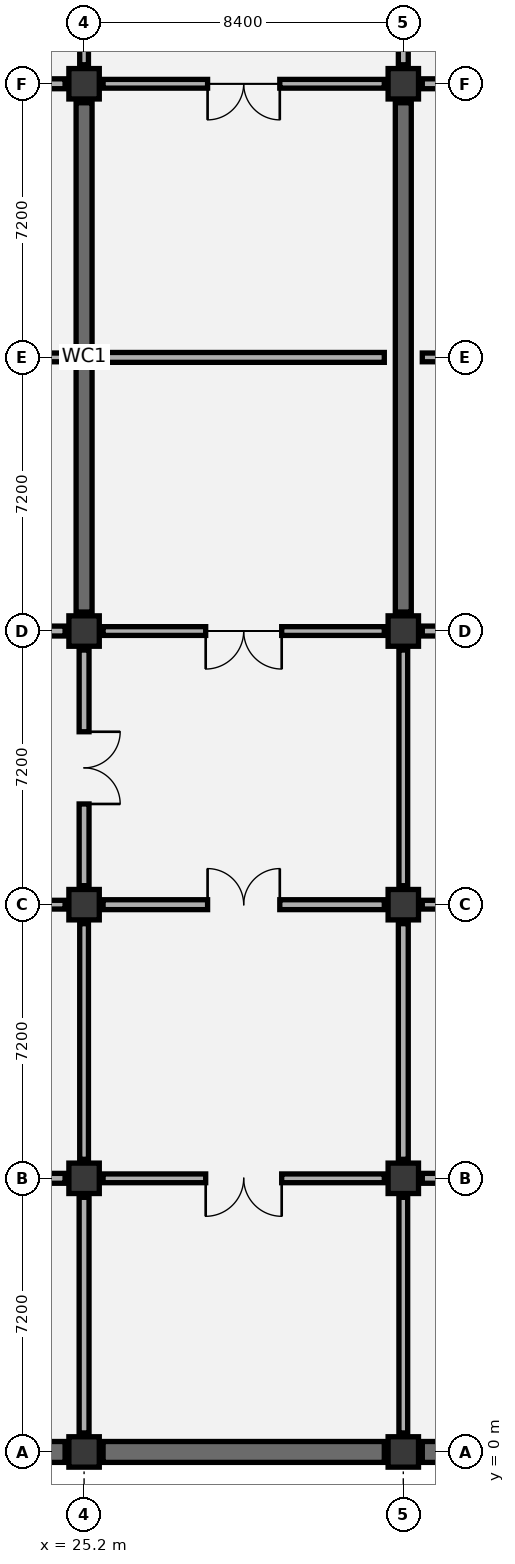
"""IFC4 building model, lengths in metres.
Left out: names, types, materials, properties, quantities, classifications, styles, units other than length and angle.
Written with IfcOpenShell. Run it as: python <this file> out.ifc"""

import sys

from ifc_helpers import new_model, si_unit, direction, frame, frame_2d, origin, origin_2d, place, context, subcontext, project, spatial, rectangle, extrude, element, fill, save


model = new_model("IFC4")
c1 = context("Model", 3, precision=1e-05, world=origin(), true_north=direction((0.0, 1.0)))
c2 = subcontext(c1, "Body", "Model", "MODEL_VIEW")
j1 = project(units=[si_unit("LENGTHUNIT", "METRE"), si_unit("PLANEANGLEUNIT", "RADIAN")], contexts=[c1])
p1 = place(None, origin())
s1 = spatial("IfcSite", under=j1, at=p1, CompositionType="ELEMENT")
p2 = place(p1, origin())
s2 = spatial("IfcBuilding", under=s1, at=p2, CompositionType="ELEMENT")
p3 = place(p2, frame((0.0, 0.0, -9.6)))
s3 = spatial("IfcBuildingStorey", under=s2, at=p3, CompositionType="ELEMENT", Elevation=-9.6)
for number, where, z_axis, x_axis in (
    (1, (25.2, 0.0, 0.0), (0.0, 0.0, 1.0), (1.0, 0.0, 0.0)),
    (2, (25.2, 7.2, 0.0), (0.0, 0.0, 1.0), (1.0, 0.0, 0.0)),
    (3, (25.2, 14.4, 0.0), (0.0, 0.0, 1.0), (1.0, 0.0, 0.0)),
    (4, (25.2, 21.6, 0.0), (0.0, 0.0, 1.0), (1.0, 0.0, 0.0)),
    (5, (25.2, 36.0, 0.0), (0.0, 0.0, 1.0), (1.0, 0.0, 0.0)),
    (6, (33.6, 0.0, 0.0), (0.0, 0.0, 1.0), (1.0, 0.0, 0.0)),
    (7, (33.6, 7.2, 0.0), (0.0, 0.0, 1.0), (1.0, 0.0, 0.0)),
    (8, (33.6, 14.4, 0.0), (0.0, 0.0, 1.0), (1.0, 0.0, 0.0)),
    (9, (33.6, 21.6, 0.0), (0.0, 0.0, 1.0), (1.0, 0.0, 0.0)),
    (10, (33.6, 36.0, 0.0), (0.0, 0.0, 1.0), (1.0, 0.0, 0.0)),
):
    element("IfcColumn", number, at=place(p3, frame(where, z_axis=z_axis, x_axis=x_axis)), inside=s3, PredefinedType="COLUMN", context=c2, shape_type="SweptSolid", body=[
        extrude(rectangle(XDim=0.8, YDim=0.8, at=origin_2d()), origin(), (0.0, 0.0, 1.0), 4.8),
    ])
p4 = place(p3, frame((17.3, 0.0, 0.0), z_axis=(0.0, 0.0, 1.0), x_axis=(1.0, 0.0, 0.0)))
e11 = element("IfcWall", 11, at=p4, inside=s3, PredefinedType="USERDEFINED", context=c2, shape_type="SweptSolid", body=[
    extrude(rectangle(XDim=7.4, YDim=0.55, at=frame_2d((3.7, 0.0))), origin(), (0.0, 0.0, 1.0), 4.4),
])
p5 = place(p3, frame((25.7, 0.0, 0.0), z_axis=(0.0, 0.0, 1.0), x_axis=(1.0, 0.0, 0.0)))
e12 = element("IfcWall", 12, at=p5, inside=s3, PredefinedType="USERDEFINED", context=c2, shape_type="SweptSolid", body=[
    extrude(rectangle(XDim=7.4, YDim=0.55, at=frame_2d((3.7, 0.0))), origin(), (0.0, 0.0, 1.0), 4.4),
])
p6 = place(p3, frame((34.1, 0.0, 0.0), z_axis=(0.0, 0.0, 1.0), x_axis=(1.0, 0.0, 0.0)))
e13 = element("IfcWall", 13, at=p6, inside=s3, PredefinedType="USERDEFINED", context=c2, shape_type="SweptSolid", body=[
    extrude(rectangle(XDim=7.4, YDim=0.55, at=frame_2d((3.7, 0.0))), origin(), (0.0, 0.0, 1.0), 4.4),
])
for number, where, z_axis, x_axis in (
    (14, (25.2, 22.1, 0.0), (0.0, 0.0, 1.0), (0.0, 1.0, 0.0)),
    (15, (33.6, 22.1, 0.0), (0.0, 0.0, 1.0), (0.0, 1.0, 0.0)),
):
    element("IfcWall", number, at=place(p3, frame(where, z_axis=z_axis, x_axis=x_axis)), inside=s3, PredefinedType="SHEAR", context=c2, shape_type="SweptSolid", body=[
        extrude(rectangle(XDim=13.4, YDim=0.42, at=frame_2d((6.7, 0.0))), origin(), (0.0, 0.0, 1.0), 3.9),
    ])
p7 = place(p3, frame((25.2, 0.5, 0.0), z_axis=(0.0, 0.0, 1.0), x_axis=(0.0, 1.0, 0.0)))
e16 = element("IfcWall", 16, at=p7, inside=s3, PredefinedType="PARTITIONING", context=c2, shape_type="SweptSolid", body=[
    extrude(rectangle(XDim=6.2, YDim=0.26, at=frame_2d((3.1, 0.0))), origin(), (0.0, 0.0, 1.0), 3.595),
])
p8 = place(p3, frame((17.3, 7.2, 0.0), z_axis=(0.0, 0.0, 1.0), x_axis=(1.0, 0.0, 0.0)))
e17 = element("IfcWall", 17, at=p8, inside=s3, PredefinedType="PARTITIONING", context=c2, shape_type="SweptSolid", body=[
    extrude(rectangle(XDim=7.4, YDim=0.26, at=frame_2d((3.7, 0.0))), origin(), (0.0, 0.0, 1.0), 3.495),
])
p9 = place(p8, frame((2.75, 0.0, 0.0)))
e18 = element("IfcOpeningElement", 18, at=p9, cuts=e17, PredefinedType="OPENING", context=c2, shape_type="SweptSolid", body=[
    extrude(rectangle(XDim=1.9, YDim=2.3, at=frame_2d((0.95, 1.15))), frame((0.0, 0.14, 0.0), z_axis=(0.0, -1.0, 0.0), x_axis=(1.0, 0.0, 0.0)), (0.0, 0.0, 1.0), 0.28),
])
p10 = place(p3, frame((25.2, 7.7, 0.0), z_axis=(0.0, 0.0, 1.0), x_axis=(0.0, 1.0, 0.0)))
e19 = element("IfcWall", 19, at=p10, inside=s3, PredefinedType="PARTITIONING", context=c2, shape_type="SweptSolid", body=[
    extrude(rectangle(XDim=6.2, YDim=0.23, at=frame_2d((3.1, 0.0))), origin(), (0.0, 0.0, 1.0), 3.595),
])
p11 = place(p3, frame((17.3, 14.4, 0.0), z_axis=(0.0, 0.0, 1.0), x_axis=(1.0, 0.0, 0.0)))
e20 = element("IfcWall", 20, at=p11, inside=s3, PredefinedType="PARTITIONING", context=c2, shape_type="SweptSolid", body=[
    extrude(rectangle(XDim=7.4, YDim=0.23, at=frame_2d((3.7, 0.0))), origin(), (0.0, 0.0, 1.0), 3.495),
])
p12 = place(p11, frame((2.7, 0.0, 0.0)))
e21 = element("IfcOpeningElement", 21, at=p12, cuts=e20, PredefinedType="OPENING", context=c2, shape_type="SweptSolid", body=[
    extrude(rectangle(XDim=2.0, YDim=2.35, at=frame_2d((1.0, 1.175))), frame((0.0, 0.125, 0.0), z_axis=(0.0, -1.0, 0.0), x_axis=(1.0, 0.0, 0.0)), (0.0, 0.0, 1.0), 0.25),
])
p13 = place(p3, frame((25.2, 14.9, 0.0), z_axis=(0.0, 0.0, 1.0), x_axis=(0.0, 1.0, 0.0)))
e22 = element("IfcWall", 22, at=p13, inside=s3, PredefinedType="PARTITIONING", context=c2, shape_type="SweptSolid", body=[
    extrude(rectangle(XDim=6.2, YDim=0.26, at=frame_2d((3.1, 0.0))), origin(), (0.0, 0.0, 1.0), 3.595),
])
p14 = place(p13, frame((2.15, 0.0, 0.0)))
e23 = element("IfcOpeningElement", 23, at=p14, cuts=e22, PredefinedType="OPENING", context=c2, shape_type="SweptSolid", body=[
    extrude(rectangle(XDim=1.9, YDim=2.3, at=frame_2d((0.95, 1.15))), frame((0.0, 0.14, 0.0), z_axis=(0.0, -1.0, 0.0), x_axis=(1.0, 0.0, 0.0)), (0.0, 0.0, 1.0), 0.28),
])
p15 = place(p3, frame((17.3, 21.6, 0.0), z_axis=(0.0, 0.0, 1.0), x_axis=(1.0, 0.0, 0.0)))
e24 = element("IfcWall", 24, at=p15, inside=s3, PredefinedType="PARTITIONING", context=c2, shape_type="SweptSolid", body=[
    extrude(rectangle(XDim=7.4, YDim=0.26, at=frame_2d((3.7, 0.0))), origin(), (0.0, 0.0, 1.0), 2.995),
])
p16 = place(p15, frame((2.7, 0.0, 0.0)))
e25 = element("IfcOpeningElement", 25, at=p16, cuts=e24, PredefinedType="OPENING", context=c2, shape_type="SweptSolid", body=[
    extrude(rectangle(XDim=2.0, YDim=2.35, at=frame_2d((1.0, 1.175))), frame((0.0, 0.14, 0.0), z_axis=(0.0, -1.0, 0.0), x_axis=(1.0, 0.0, 0.0)), (0.0, 0.0, 1.0), 0.28),
])
p17 = place(p3, frame((17.3, 28.8, 0.0), z_axis=(0.0, 0.0, 1.0), x_axis=(1.0, 0.0, 0.0)))
e26 = element("IfcWall", 26, at=p17, inside=s3, PredefinedType="PARTITIONING", context=c2, shape_type="SweptSolid", body=[
    extrude(rectangle(XDim=7.4, YDim=0.23, at=frame_2d((3.7, 0.0))), origin(), (0.0, 0.0, 1.0), 3.9),
])
p18 = place(p17, frame((2.75, 0.0, 0.0)))
e27 = element("IfcOpeningElement", 27, at=p18, cuts=e26, PredefinedType="OPENING", context=c2, shape_type="SweptSolid", body=[
    extrude(rectangle(XDim=1.9, YDim=2.3, at=frame_2d((0.95, 1.15))), frame((0.0, 0.125, 0.0), z_axis=(0.0, -1.0, 0.0), x_axis=(1.0, 0.0, 0.0)), (0.0, 0.0, 1.0), 0.25),
])
p19 = place(p3, frame((17.3, 36.0, 0.0), z_axis=(0.0, 0.0, 1.0), x_axis=(1.0, 0.0, 0.0)))
e28 = element("IfcWall", 28, at=p19, inside=s3, PredefinedType="PARTITIONING", context=c2, shape_type="SweptSolid", body=[
    extrude(rectangle(XDim=7.4, YDim=0.26, at=frame_2d((3.7, 0.0))), origin(), (0.0, 0.0, 1.0), 2.995),
])
p20 = place(p19, frame((2.7, 0.0, 0.0)))
e29 = element("IfcOpeningElement", 29, at=p20, cuts=e28, PredefinedType="OPENING", context=c2, shape_type="SweptSolid", body=[
    extrude(rectangle(XDim=2.0, YDim=2.35, at=frame_2d((1.0, 1.175))), frame((0.0, 0.14, 0.0), z_axis=(0.0, -1.0, 0.0), x_axis=(1.0, 0.0, 0.0)), (0.0, 0.0, 1.0), 0.28),
])
p21 = place(p3, frame((25.2, 36.5, 0.0), z_axis=(0.0, 0.0, 1.0), x_axis=(0.0, 1.0, 0.0)))
e30 = element("IfcWall", 30, at=p21, inside=s3, PredefinedType="PARTITIONING", context=c2, shape_type="SweptSolid", body=[
    extrude(rectangle(XDim=6.2, YDim=0.23, at=frame_2d((3.1, 0.0))), origin(), (0.0, 0.0, 1.0), 3.595),
])
p22 = place(p21, frame((2.15, 0.0, 0.0)))
e31 = element("IfcOpeningElement", 31, at=p22, cuts=e30, PredefinedType="OPENING", context=c2, shape_type="SweptSolid", body=[
    extrude(rectangle(XDim=1.9, YDim=2.3, at=frame_2d((0.95, 1.15))), frame((0.0, 0.125, 0.0), z_axis=(0.0, -1.0, 0.0), x_axis=(1.0, 0.0, 0.0)), (0.0, 0.0, 1.0), 0.25),
])
p23 = place(p3, frame((33.6, 0.5, 0.0), z_axis=(0.0, 0.0, 1.0), x_axis=(0.0, 1.0, 0.0)))
e32 = element("IfcWall", 32, at=p23, inside=s3, PredefinedType="PARTITIONING", context=c2, shape_type="SweptSolid", body=[
    extrude(rectangle(XDim=6.2, YDim=0.23, at=frame_2d((3.1, 0.0))), origin(), (0.0, 0.0, 1.0), 3.595),
])
p24 = place(p3, frame((25.7, 7.2, 0.0), z_axis=(0.0, 0.0, 1.0), x_axis=(1.0, 0.0, 0.0)))
e33 = element("IfcWall", 33, at=p24, inside=s3, PredefinedType="PARTITIONING", context=c2, shape_type="SweptSolid", body=[
    extrude(rectangle(XDim=7.4, YDim=0.23, at=frame_2d((3.7, 0.0))), origin(), (0.0, 0.0, 1.0), 3.495),
])
p25 = place(p24, frame((2.7, 0.0, 0.0)))
e34 = element("IfcOpeningElement", 34, at=p25, cuts=e33, PredefinedType="OPENING", context=c2, shape_type="SweptSolid", body=[
    extrude(rectangle(XDim=2.0, YDim=2.35, at=frame_2d((1.0, 1.175))), frame((0.0, 0.125, 0.0), z_axis=(0.0, -1.0, 0.0), x_axis=(1.0, 0.0, 0.0)), (0.0, 0.0, 1.0), 0.25),
])
p26 = place(p3, frame((33.6, 7.7, 0.0), z_axis=(0.0, 0.0, 1.0), x_axis=(0.0, 1.0, 0.0)))
e35 = element("IfcWall", 35, at=p26, inside=s3, PredefinedType="PARTITIONING", context=c2, shape_type="SweptSolid", body=[
    extrude(rectangle(XDim=6.2, YDim=0.26, at=frame_2d((3.1, 0.0))), origin(), (0.0, 0.0, 1.0), 3.595),
])
p27 = place(p3, frame((25.7, 14.4, 0.0), z_axis=(0.0, 0.0, 1.0), x_axis=(1.0, 0.0, 0.0)))
e36 = element("IfcWall", 36, at=p27, inside=s3, PredefinedType="PARTITIONING", context=c2, shape_type="SweptSolid", body=[
    extrude(rectangle(XDim=7.4, YDim=0.26, at=frame_2d((3.7, 0.0))), origin(), (0.0, 0.0, 1.0), 3.495),
])
p28 = place(p27, frame((2.75, 0.0, 0.0)))
e37 = element("IfcOpeningElement", 37, at=p28, cuts=e36, PredefinedType="OPENING", context=c2, shape_type="SweptSolid", body=[
    extrude(rectangle(XDim=1.9, YDim=2.3, at=frame_2d((0.95, 1.15))), frame((0.0, 0.14, 0.0), z_axis=(0.0, -1.0, 0.0), x_axis=(1.0, 0.0, 0.0)), (0.0, 0.0, 1.0), 0.28),
])
p29 = place(p3, frame((33.6, 14.9, 0.0), z_axis=(0.0, 0.0, 1.0), x_axis=(0.0, 1.0, 0.0)))
e38 = element("IfcWall", 38, at=p29, inside=s3, PredefinedType="PARTITIONING", context=c2, shape_type="SweptSolid", body=[
    extrude(rectangle(XDim=6.2, YDim=0.23, at=frame_2d((3.1, 0.0))), origin(), (0.0, 0.0, 1.0), 3.595),
])
p30 = place(p3, frame((25.7, 21.6, 0.0), z_axis=(0.0, 0.0, 1.0), x_axis=(1.0, 0.0, 0.0)))
e39 = element("IfcWall", 39, at=p30, inside=s3, PredefinedType="PARTITIONING", context=c2, shape_type="SweptSolid", body=[
    extrude(rectangle(XDim=7.4, YDim=0.23, at=frame_2d((3.7, 0.0))), origin(), (0.0, 0.0, 1.0), 2.995),
])
p31 = place(p30, frame((2.7, 0.0, 0.0)))
e40 = element("IfcOpeningElement", 40, at=p31, cuts=e39, PredefinedType="OPENING", context=c2, shape_type="SweptSolid", body=[
    extrude(rectangle(XDim=2.0, YDim=2.35, at=frame_2d((1.0, 1.175))), frame((0.0, 0.125, 0.0), z_axis=(0.0, -1.0, 0.0), x_axis=(1.0, 0.0, 0.0)), (0.0, 0.0, 1.0), 0.25),
])
p32 = place(p3, frame((25.7, 28.8, 0.0), z_axis=(0.0, 0.0, 1.0), x_axis=(1.0, 0.0, 0.0)))
e41 = element("IfcWall", 41, at=p32, inside=s3, PredefinedType="PARTITIONING", context=c2, shape_type="SweptSolid", body=[
    extrude(rectangle(XDim=7.4, YDim=0.26, at=frame_2d((3.7, 0.0))), origin(), (0.0, 0.0, 1.0), 3.9),
])
p33 = place(p3, frame((25.7, 36.0, 0.0), z_axis=(0.0, 0.0, 1.0), x_axis=(1.0, 0.0, 0.0)))
e42 = element("IfcWall", 42, at=p33, inside=s3, PredefinedType="PARTITIONING", context=c2, shape_type="SweptSolid", body=[
    extrude(rectangle(XDim=7.4, YDim=0.23, at=frame_2d((3.7, 0.0))), origin(), (0.0, 0.0, 1.0), 2.995),
])
p34 = place(p33, frame((2.75, 0.0, 0.0)))
e43 = element("IfcOpeningElement", 43, at=p34, cuts=e42, PredefinedType="OPENING", context=c2, shape_type="SweptSolid", body=[
    extrude(rectangle(XDim=1.9, YDim=2.3, at=frame_2d((0.95, 1.15))), frame((0.0, 0.125, 0.0), z_axis=(0.0, -1.0, 0.0), x_axis=(1.0, 0.0, 0.0)), (0.0, 0.0, 1.0), 0.25),
])
p35 = place(p3, frame((33.6, 36.5, 0.0), z_axis=(0.0, 0.0, 1.0), x_axis=(0.0, 1.0, 0.0)))
e44 = element("IfcWall", 44, at=p35, inside=s3, PredefinedType="PARTITIONING", context=c2, shape_type="SweptSolid", body=[
    extrude(rectangle(XDim=6.2, YDim=0.26, at=frame_2d((3.1, 0.0))), origin(), (0.0, 0.0, 1.0), 3.595),
])
p36 = place(p3, frame((34.1, 7.2, 0.0), z_axis=(0.0, 0.0, 1.0), x_axis=(1.0, 0.0, 0.0)))
e45 = element("IfcWall", 45, at=p36, inside=s3, PredefinedType="PARTITIONING", context=c2, shape_type="SweptSolid", body=[
    extrude(rectangle(XDim=7.4, YDim=0.26, at=frame_2d((3.7, 0.0))), origin(), (0.0, 0.0, 1.0), 3.495),
])
p37 = place(p36, frame((2.75, 0.0, 0.0)))
e46 = element("IfcOpeningElement", 46, at=p37, cuts=e45, PredefinedType="OPENING", context=c2, shape_type="SweptSolid", body=[
    extrude(rectangle(XDim=1.9, YDim=2.3, at=frame_2d((0.95, 1.15))), frame((0.0, 0.14, 0.0), z_axis=(0.0, -1.0, 0.0), x_axis=(1.0, 0.0, 0.0)), (0.0, 0.0, 1.0), 0.28),
])
p38 = place(p3, frame((34.1, 14.4, 0.0), z_axis=(0.0, 0.0, 1.0), x_axis=(1.0, 0.0, 0.0)))
e47 = element("IfcWall", 47, at=p38, inside=s3, PredefinedType="PARTITIONING", context=c2, shape_type="SweptSolid", body=[
    extrude(rectangle(XDim=7.4, YDim=0.23, at=frame_2d((3.7, 0.0))), origin(), (0.0, 0.0, 1.0), 3.495),
])
p39 = place(p38, frame((2.7, 0.0, 0.0)))
e48 = element("IfcOpeningElement", 48, at=p39, cuts=e47, PredefinedType="OPENING", context=c2, shape_type="SweptSolid", body=[
    extrude(rectangle(XDim=2.0, YDim=2.35, at=frame_2d((1.0, 1.175))), frame((0.0, 0.125, 0.0), z_axis=(0.0, -1.0, 0.0), x_axis=(1.0, 0.0, 0.0)), (0.0, 0.0, 1.0), 0.25),
])
p40 = place(p3, frame((34.1, 21.6, 0.0), z_axis=(0.0, 0.0, 1.0), x_axis=(1.0, 0.0, 0.0)))
e49 = element("IfcWall", 49, at=p40, inside=s3, PredefinedType="PARTITIONING", context=c2, shape_type="SweptSolid", body=[
    extrude(rectangle(XDim=7.4, YDim=0.26, at=frame_2d((3.7, 0.0))), origin(), (0.0, 0.0, 1.0), 2.995),
])
p41 = place(p40, frame((2.75, 0.0, 0.0)))
e50 = element("IfcOpeningElement", 50, at=p41, cuts=e49, PredefinedType="OPENING", context=c2, shape_type="SweptSolid", body=[
    extrude(rectangle(XDim=1.9, YDim=2.3, at=frame_2d((0.95, 1.15))), frame((0.0, 0.14, 0.0), z_axis=(0.0, -1.0, 0.0), x_axis=(1.0, 0.0, 0.0)), (0.0, 0.0, 1.0), 0.28),
])
p42 = place(p3, frame((34.1, 28.8, 0.0), z_axis=(0.0, 0.0, 1.0), x_axis=(1.0, 0.0, 0.0)))
e51 = element("IfcWall", 51, at=p42, inside=s3, PredefinedType="PARTITIONING", context=c2, shape_type="SweptSolid", body=[
    extrude(rectangle(XDim=7.4, YDim=0.23, at=frame_2d((3.7, 0.0))), origin(), (0.0, 0.0, 1.0), 3.9),
])
p43 = place(p42, frame((2.7, 0.0, 0.0)))
e52 = element("IfcOpeningElement", 52, at=p43, cuts=e51, PredefinedType="OPENING", context=c2, shape_type="SweptSolid", body=[
    extrude(rectangle(XDim=2.0, YDim=2.35, at=frame_2d((1.0, 1.175))), frame((0.0, 0.125, 0.0), z_axis=(0.0, -1.0, 0.0), x_axis=(1.0, 0.0, 0.0)), (0.0, 0.0, 1.0), 0.25),
])
p44 = place(p3, frame((34.1, 36.0, 0.0), z_axis=(0.0, 0.0, 1.0), x_axis=(1.0, 0.0, 0.0)))
e53 = element("IfcWall", 53, at=p44, inside=s3, PredefinedType="PARTITIONING", context=c2, shape_type="SweptSolid", body=[
    extrude(rectangle(XDim=7.4, YDim=0.26, at=frame_2d((3.7, 0.0))), origin(), (0.0, 0.0, 1.0), 2.995),
])
p45 = place(p44, frame((2.7, 0.0, 0.0)))
e54 = element("IfcOpeningElement", 54, at=p45, cuts=e53, PredefinedType="OPENING", context=c2, shape_type="SweptSolid", body=[
    extrude(rectangle(XDim=2.0, YDim=2.35, at=frame_2d((1.0, 1.175))), frame((0.0, 0.14, 0.0), z_axis=(0.0, -1.0, 0.0), x_axis=(1.0, 0.0, 0.0)), (0.0, 0.0, 1.0), 0.28),
])
p46 = place(p14, frame((1.9, 0.0, 0.0), z_axis=(0.0, 0.0, 1.0), x_axis=(-1.0, 0.0, 0.0)))
e55 = element("IfcDoor", 55, at=p46, inside=s3, OperationType="DOUBLE_DOOR_SINGLE_SWING", PredefinedType="DOOR", context=c2, shape_type="SweptSolid", body=[
    extrude(rectangle(XDim=1.9, YDim=2.3, at=frame_2d((0.95, 1.15))), frame((0.0, 0.025, 0.0), z_axis=(0.0, -1.0, 0.0), x_axis=(1.0, 0.0, 0.0)), (0.0, 0.0, 1.0), 0.05),
])
fill(e23, e55)
p47 = place(p25, frame((2.0, 0.0, 0.0), z_axis=(0.0, 0.0, 1.0), x_axis=(-1.0, 0.0, 0.0)))
e56 = element("IfcDoor", 56, at=p47, inside=s3, OperationType="DOUBLE_DOOR_SINGLE_SWING", PredefinedType="DOOR", context=c2, shape_type="SweptSolid", body=[
    extrude(rectangle(XDim=2.0, YDim=2.35, at=frame_2d((1.0, 1.175))), frame((0.0, 0.025, 0.0), z_axis=(0.0, -1.0, 0.0), x_axis=(1.0, 0.0, 0.0)), (0.0, 0.0, 1.0), 0.05),
])
fill(e34, e56)
p48 = place(p28, origin())
e57 = element("IfcDoor", 57, at=p48, inside=s3, OperationType="DOUBLE_DOOR_SINGLE_SWING", PredefinedType="DOOR", context=c2, shape_type="SweptSolid", body=[
    extrude(rectangle(XDim=1.9, YDim=2.3, at=frame_2d((0.95, 1.15))), frame((0.0, 0.025, 0.0), z_axis=(0.0, -1.0, 0.0), x_axis=(1.0, 0.0, 0.0)), (0.0, 0.0, 1.0), 0.05),
])
fill(e37, e57)
p49 = place(p31, frame((2.0, 0.0, 0.0), z_axis=(0.0, 0.0, 1.0), x_axis=(-1.0, 0.0, 0.0)))
e58 = element("IfcDoor", 58, at=p49, inside=s3, OperationType="DOUBLE_DOOR_SINGLE_SWING", PredefinedType="DOOR", context=c2, shape_type="SweptSolid", body=[
    extrude(rectangle(XDim=2.0, YDim=2.35, at=frame_2d((1.0, 1.175))), frame((0.0, 0.025, 0.0), z_axis=(0.0, -1.0, 0.0), x_axis=(1.0, 0.0, 0.0)), (0.0, 0.0, 1.0), 0.05),
])
fill(e40, e58)
p50 = place(p34, frame((1.9, 0.0, 0.0), z_axis=(0.0, 0.0, 1.0), x_axis=(-1.0, 0.0, 0.0)))
e59 = element("IfcDoor", 59, at=p50, inside=s3, OperationType="DOUBLE_DOOR_SINGLE_SWING", PredefinedType="DOOR", context=c2, shape_type="SweptSolid", body=[
    extrude(rectangle(XDim=1.9, YDim=2.3, at=frame_2d((0.95, 1.15))), frame((0.0, 0.025, 0.0), z_axis=(0.0, -1.0, 0.0), x_axis=(1.0, 0.0, 0.0)), (0.0, 0.0, 1.0), 0.05),
])
fill(e43, e59)
save(model, sys.argv[1])
